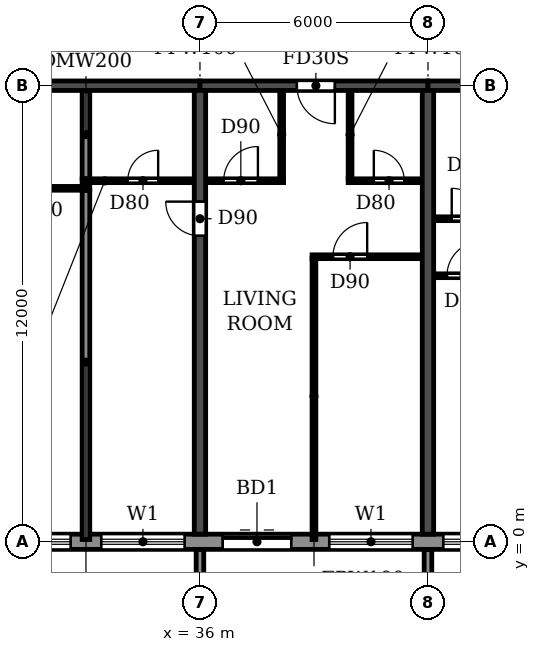
"""IFC4 building model, lengths in metres.
Left out: names, types, materials, properties, quantities, classifications, styles, units other than length and angle.
Written with IfcOpenShell. Run it as: python <this file> out.ifc"""

import sys

from ifc_helpers import new_model, si_unit, direction, frame, frame_2d, origin, place, context, subcontext, project, spatial, polyline, rectangle, outline, extrude, source, transform, mapped, element, fill, save


model = new_model("IFC4")
c1 = context("Model", 3, precision=1e-05, world=origin(), true_north=direction((0.0, 1.0)))
c2 = subcontext(c1, "Body", "Model", "MODEL_VIEW")
j1 = project(units=[si_unit("LENGTHUNIT", "METRE"), si_unit("PLANEANGLEUNIT", "RADIAN")], contexts=[c1])
p1 = place(None, origin())
s1 = spatial("IfcSite", under=j1, at=p1, CompositionType="ELEMENT")
p2 = place(p1, origin())
s2 = spatial("IfcBuilding", under=s1, at=p2, CompositionType="ELEMENT")
p3 = place(p2, frame((0.0, 0.0, 132.3)))
s3 = spatial("IfcBuildingStorey", under=s2, at=p3, CompositionType="ELEMENT", Elevation=132.3)
p4 = place(p3, frame((36.0, 0.2, 0.0), z_axis=(0.0, 0.0, 1.0), x_axis=(0.0, 1.0, 0.0)))
e1 = element("IfcWall", 1, at=p4, inside=s3, PredefinedType="SHEAR", context=c2, shape_type="SweptSolid", body=[
    extrude(rectangle(XDim=11.675, YDim=0.3, at=frame_2d((5.837, 0.0))), origin(), (0.0, 0.0, 1.0), 3.07),
])
p5 = place(p4, frame((7.85, 0.0, 0.0)))
e2 = element("IfcOpeningElement", 2, at=p5, cuts=e1, PredefinedType="OPENING", context=c2, shape_type="SweptSolid", body=[
    extrude(rectangle(XDim=0.9, YDim=2.1, at=frame_2d((0.45, 1.05))), frame((0.0, 0.16, 0.0), z_axis=(0.0, -1.0, 0.0), x_axis=(1.0, 0.0, 0.0)), (0.0, 0.0, 1.0), 0.32),
])
p6 = place(p3, frame((42.0, 0.2, 0.0), z_axis=(0.0, 0.0, 1.0), x_axis=(0.0, 1.0, 0.0)))
e3 = element("IfcWall", 3, at=p6, inside=s3, PredefinedType="SHEAR", context=c2, shape_type="SweptSolid", body=[
    extrude(rectangle(XDim=11.675, YDim=0.3, at=frame_2d((5.837, 0.0))), origin(), (0.0, 0.0, 1.0), 3.07),
])
p7 = place(p3, frame((30.0, 12.0, 0.0), z_axis=(0.0, 0.0, 1.0), x_axis=(1.0, 0.0, 0.0)))
e4 = element("IfcWall", 4, at=p7, inside=s3, PredefinedType="SHEAR", context=c2, shape_type="SweptSolid", body=[
    extrude(rectangle(XDim=6.0, YDim=0.25, at=frame_2d((3.0, 0.0))), origin(), (0.0, 0.0, 1.0), 2.47),
])
p8 = place(p3, frame((36.0, 12.0, 0.0), z_axis=(0.0, 0.0, 1.0), x_axis=(1.0, 0.0, 0.0)))
e5 = element("IfcWall", 5, at=p8, inside=s3, PredefinedType="SHEAR", context=c2, shape_type="SweptSolid", body=[
    extrude(rectangle(XDim=6.0, YDim=0.25, at=frame_2d((3.0, 0.0))), origin(), (0.0, 0.0, 1.0), 2.47),
])
p9 = place(p8, frame((2.55, 0.0, 0.0)))
e6 = element("IfcOpeningElement", 6, at=p9, cuts=e5, PredefinedType="OPENING", context=c2, shape_type="SweptSolid", body=[
    extrude(rectangle(XDim=1.0, YDim=2.1, at=frame_2d((0.5, 1.05))), frame((0.0, 0.135, 0.0), z_axis=(0.0, -1.0, 0.0), x_axis=(1.0, 0.0, 0.0)), (0.0, 0.0, 1.0), 0.27),
])
p10 = place(p3, frame((42.0, 12.0, 0.0), z_axis=(0.0, 0.0, 1.0), x_axis=(1.0, 0.0, 0.0)))
e7 = element("IfcWall", 7, at=p10, inside=s3, PredefinedType="SHEAR", context=c2, shape_type="SweptSolid", body=[
    extrude(rectangle(XDim=6.0, YDim=0.25, at=frame_2d((3.0, 0.0))), origin(), (0.0, 0.0, 1.0), 2.47),
])
p11 = place(p10, frame((2.45, 0.0, 0.0)))
e8 = element("IfcOpeningElement", 8, at=p11, cuts=e7, PredefinedType="OPENING", context=c2, shape_type="SweptSolid", body=[
    extrude(rectangle(XDim=1.0, YDim=2.1, at=frame_2d((0.5, 1.05))), frame((0.0, 0.135, 0.0), z_axis=(0.0, -1.0, 0.0), x_axis=(1.0, 0.0, 0.0)), (0.0, 0.0, 1.0), 0.27),
])
p12 = place(p3, frame((16.683, 0.0, 0.0), z_axis=(0.0, 0.0, 1.0), x_axis=(1.0, 0.0, 0.0)))
e9 = element("IfcWall", 9, at=p12, inside=s3, PredefinedType="STANDARD", context=c2, shape_type="SweptSolid", body=[
    extrude(rectangle(XDim=68.634, YDim=0.4, at=frame_2d((34.317, 0.0))), origin(), (0.0, 0.0, 1.0), 3.07),
])
p13 = place(p12, frame((1.717, 0.0, 0.9)))
e10 = element("IfcOpeningElement", 10, at=p13, cuts=e9, PredefinedType="OPENING", context=c2, shape_type="SweptSolid", body=[
    extrude(rectangle(XDim=2.2, YDim=1.5, at=frame_2d((1.1, 0.75))), frame((0.0, 0.21, 0.0), z_axis=(0.0, -1.0, 0.0), x_axis=(1.0, 0.0, 0.0)), (0.0, 0.0, 1.0), 0.42),
])
p14 = place(p12, frame((4.717, 0.0, 0.9)))
e11 = element("IfcOpeningElement", 11, at=p14, cuts=e9, PredefinedType="OPENING", context=c2, shape_type="SweptSolid", body=[
    extrude(rectangle(XDim=2.2, YDim=1.5, at=frame_2d((1.1, 0.75))), frame((0.0, 0.21, 0.0), z_axis=(0.0, -1.0, 0.0), x_axis=(1.0, 0.0, 0.0)), (0.0, 0.0, 1.0), 0.42),
])
p15 = place(p12, frame((7.717, 0.0, 0.9)))
e12 = element("IfcOpeningElement", 12, at=p15, cuts=e9, PredefinedType="OPENING", context=c2, shape_type="SweptSolid", body=[
    extrude(rectangle(XDim=2.2, YDim=1.5, at=frame_2d((1.1, 0.75))), frame((0.0, 0.21, 0.0), z_axis=(0.0, -1.0, 0.0), x_axis=(1.0, 0.0, 0.0)), (0.0, 0.0, 1.0), 0.42),
])
p16 = place(p12, frame((10.917, 0.0, 0.0)))
e13 = element("IfcOpeningElement", 13, at=p16, cuts=e9, PredefinedType="OPENING", context=c2, shape_type="SweptSolid", body=[
    extrude(rectangle(XDim=1.8, YDim=2.4, at=frame_2d((0.9, 1.2))), frame((0.0, 0.21, 0.0), z_axis=(0.0, -1.0, 0.0), x_axis=(1.0, 0.0, 0.0)), (0.0, 0.0, 1.0), 0.42),
])
p17 = place(p12, frame((13.717, 0.0, 0.9)))
e14 = element("IfcOpeningElement", 14, at=p17, cuts=e9, PredefinedType="OPENING", context=c2, shape_type="SweptSolid", body=[
    extrude(rectangle(XDim=2.2, YDim=1.5, at=frame_2d((1.1, 0.75))), frame((0.0, 0.21, 0.0), z_axis=(0.0, -1.0, 0.0), x_axis=(1.0, 0.0, 0.0)), (0.0, 0.0, 1.0), 0.42),
])
p18 = place(p12, frame((16.717, 0.0, 0.9)))
e15 = element("IfcOpeningElement", 15, at=p18, cuts=e9, PredefinedType="OPENING", context=c2, shape_type="SweptSolid", body=[
    extrude(rectangle(XDim=2.2, YDim=1.5, at=frame_2d((1.1, 0.75))), frame((0.0, 0.21, 0.0), z_axis=(0.0, -1.0, 0.0), x_axis=(1.0, 0.0, 0.0)), (0.0, 0.0, 1.0), 0.42),
])
p19 = place(p12, frame((19.917, 0.0, 0.0)))
e16 = element("IfcOpeningElement", 16, at=p19, cuts=e9, PredefinedType="OPENING", context=c2, shape_type="SweptSolid", body=[
    extrude(rectangle(XDim=1.8, YDim=2.4, at=frame_2d((0.9, 1.2))), frame((0.0, 0.21, 0.0), z_axis=(0.0, -1.0, 0.0), x_axis=(1.0, 0.0, 0.0)), (0.0, 0.0, 1.0), 0.42),
])
p20 = place(p12, frame((22.717, 0.0, 0.9)))
e17 = element("IfcOpeningElement", 17, at=p20, cuts=e9, PredefinedType="OPENING", context=c2, shape_type="SweptSolid", body=[
    extrude(rectangle(XDim=2.2, YDim=1.5, at=frame_2d((1.1, 0.75))), frame((0.0, 0.21, 0.0), z_axis=(0.0, -1.0, 0.0), x_axis=(1.0, 0.0, 0.0)), (0.0, 0.0, 1.0), 0.42),
])
p21 = place(p12, frame((25.717, 0.0, 0.9)))
e18 = element("IfcOpeningElement", 18, at=p21, cuts=e9, PredefinedType="OPENING", context=c2, shape_type="SweptSolid", body=[
    extrude(rectangle(XDim=2.2, YDim=1.5, at=frame_2d((1.1, 0.75))), frame((0.0, 0.21, 0.0), z_axis=(0.0, -1.0, 0.0), x_axis=(1.0, 0.0, 0.0)), (0.0, 0.0, 1.0), 0.42),
])
p22 = place(p12, frame((28.717, 0.0, 0.9)))
e19 = element("IfcOpeningElement", 19, at=p22, cuts=e9, PredefinedType="OPENING", context=c2, shape_type="SweptSolid", body=[
    extrude(rectangle(XDim=2.2, YDim=1.5, at=frame_2d((1.1, 0.75))), frame((0.0, 0.21, 0.0), z_axis=(0.0, -1.0, 0.0), x_axis=(1.0, 0.0, 0.0)), (0.0, 0.0, 1.0), 0.42),
])
p23 = place(p12, frame((31.917, 0.0, 0.0)))
e20 = element("IfcOpeningElement", 20, at=p23, cuts=e9, PredefinedType="OPENING", context=c2, shape_type="SweptSolid", body=[
    extrude(rectangle(XDim=1.8, YDim=2.4, at=frame_2d((0.9, 1.2))), frame((0.0, 0.21, 0.0), z_axis=(0.0, -1.0, 0.0), x_axis=(1.0, 0.0, 0.0)), (0.0, 0.0, 1.0), 0.42),
])
p24 = place(p12, frame((34.717, 0.0, 0.9)))
e21 = element("IfcOpeningElement", 21, at=p24, cuts=e9, PredefinedType="OPENING", context=c2, shape_type="SweptSolid", body=[
    extrude(rectangle(XDim=2.2, YDim=1.5, at=frame_2d((1.1, 0.75))), frame((0.0, 0.21, 0.0), z_axis=(0.0, -1.0, 0.0), x_axis=(1.0, 0.0, 0.0)), (0.0, 0.0, 1.0), 0.42),
])
p25 = place(p12, frame((37.717, 0.0, 0.9)))
e22 = element("IfcOpeningElement", 22, at=p25, cuts=e9, PredefinedType="OPENING", context=c2, shape_type="SweptSolid", body=[
    extrude(rectangle(XDim=2.2, YDim=1.5, at=frame_2d((1.1, 0.75))), frame((0.0, 0.21, 0.0), z_axis=(0.0, -1.0, 0.0), x_axis=(1.0, 0.0, 0.0)), (0.0, 0.0, 1.0), 0.42),
])
p26 = place(p12, frame((40.717, 0.0, 0.9)))
e23 = element("IfcOpeningElement", 23, at=p26, cuts=e9, PredefinedType="OPENING", context=c2, shape_type="SweptSolid", body=[
    extrude(rectangle(XDim=2.2, YDim=1.5, at=frame_2d((1.1, 0.75))), frame((0.0, 0.21, 0.0), z_axis=(0.0, -1.0, 0.0), x_axis=(1.0, 0.0, 0.0)), (0.0, 0.0, 1.0), 0.42),
])
p27 = place(p12, frame((43.717, 0.0, 0.9)))
e24 = element("IfcOpeningElement", 24, at=p27, cuts=e9, PredefinedType="OPENING", context=c2, shape_type="SweptSolid", body=[
    extrude(rectangle(XDim=2.2, YDim=1.5, at=frame_2d((1.1, 0.75))), frame((0.0, 0.21, 0.0), z_axis=(0.0, -1.0, 0.0), x_axis=(1.0, 0.0, 0.0)), (0.0, 0.0, 1.0), 0.42),
])
p28 = place(p12, frame((46.917, 0.0, 0.0)))
e25 = element("IfcOpeningElement", 25, at=p28, cuts=e9, PredefinedType="OPENING", context=c2, shape_type="SweptSolid", body=[
    extrude(rectangle(XDim=1.8, YDim=2.4, at=frame_2d((0.9, 1.2))), frame((0.0, 0.21, 0.0), z_axis=(0.0, -1.0, 0.0), x_axis=(1.0, 0.0, 0.0)), (0.0, 0.0, 1.0), 0.42),
])
p29 = place(p12, frame((49.717, 0.0, 0.9)))
e26 = element("IfcOpeningElement", 26, at=p29, cuts=e9, PredefinedType="OPENING", context=c2, shape_type="SweptSolid", body=[
    extrude(rectangle(XDim=2.2, YDim=1.5, at=frame_2d((1.1, 0.75))), frame((0.0, 0.21, 0.0), z_axis=(0.0, -1.0, 0.0), x_axis=(1.0, 0.0, 0.0)), (0.0, 0.0, 1.0), 0.42),
])
p30 = place(p12, frame((52.717, 0.0, 0.9)))
e27 = element("IfcOpeningElement", 27, at=p30, cuts=e9, PredefinedType="OPENING", context=c2, shape_type="SweptSolid", body=[
    extrude(rectangle(XDim=2.2, YDim=1.5, at=frame_2d((1.1, 0.75))), frame((0.0, 0.21, 0.0), z_axis=(0.0, -1.0, 0.0), x_axis=(1.0, 0.0, 0.0)), (0.0, 0.0, 1.0), 0.42),
])
p31 = place(p12, frame((55.717, 0.0, 0.9)))
e28 = element("IfcOpeningElement", 28, at=p31, cuts=e9, PredefinedType="OPENING", context=c2, shape_type="SweptSolid", body=[
    extrude(rectangle(XDim=2.2, YDim=1.5, at=frame_2d((1.1, 0.75))), frame((0.0, 0.21, 0.0), z_axis=(0.0, -1.0, 0.0), x_axis=(1.0, 0.0, 0.0)), (0.0, 0.0, 1.0), 0.42),
])
p32 = place(p12, frame((58.917, 0.0, 0.0)))
e29 = element("IfcOpeningElement", 29, at=p32, cuts=e9, PredefinedType="OPENING", context=c2, shape_type="SweptSolid", body=[
    extrude(rectangle(XDim=1.8, YDim=2.4, at=frame_2d((0.9, 1.2))), frame((0.0, 0.21, 0.0), z_axis=(0.0, -1.0, 0.0), x_axis=(1.0, 0.0, 0.0)), (0.0, 0.0, 1.0), 0.42),
])
p33 = place(p12, frame((61.717, 0.0, 0.9)))
e30 = element("IfcOpeningElement", 30, at=p33, cuts=e9, PredefinedType="OPENING", context=c2, shape_type="SweptSolid", body=[
    extrude(rectangle(XDim=2.2, YDim=1.5, at=frame_2d((1.1, 0.75))), frame((0.0, 0.21, 0.0), z_axis=(0.0, -1.0, 0.0), x_axis=(1.0, 0.0, 0.0)), (0.0, 0.0, 1.0), 0.42),
])
p34 = place(p12, frame((64.717, 0.0, 0.9)))
e31 = element("IfcOpeningElement", 31, at=p34, cuts=e9, PredefinedType="OPENING", context=c2, shape_type="SweptSolid", body=[
    extrude(rectangle(XDim=2.2, YDim=1.5, at=frame_2d((1.1, 0.75))), frame((0.0, 0.21, 0.0), z_axis=(0.0, -1.0, 0.0), x_axis=(1.0, 0.0, 0.0)), (0.0, 0.0, 1.0), 0.42),
])
m1 = source(origin(), c2, "Body", "SweptSolid", [
    extrude(outline(polyline([(0.0, 0.0), (0.2, 0.0), (0.2, 1.65), (0.0, 1.65), (0.0, 0.0)])), origin(), (0.0, 0.0, 1.0), 3.1),
])
for number, where in (
    (32, (35.9, -1.85, 0.0)),
    (33, (41.9, -1.85, 0.0)),
):
    element("IfcWall", number, at=place(p3, frame(where)), inside=s3, PredefinedType="STANDARD", context=c2, shape_type="MappedRepresentation", body=[
        mapped(m1, transform((0.0, 0.0, 0.0))),
    ])
p35 = place(p3, frame((33.0, 0.06, 0.0), z_axis=(0.0, 0.0, 1.0), x_axis=(0.0, 1.0, 0.0)))
e34 = element("IfcWall", 34, at=p35, inside=s3, PredefinedType="PARTITIONING", context=c2, shape_type="SweptSolid", body=[
    extrude(rectangle(XDim=9.19, YDim=0.2, at=frame_2d((4.595, 0.0))), origin(), (0.0, 0.0, 1.0), 3.07),
])
p36 = place(p3, frame((33.0, 9.55, 0.0), z_axis=(0.0, 0.0, 1.0), x_axis=(0.0, 1.0, 0.0)))
e35 = element("IfcWall", 35, at=p36, inside=s3, PredefinedType="PARTITIONING", context=c2, shape_type="SweptSolid", body=[
    extrude(rectangle(XDim=2.315, YDim=0.2, at=frame_2d((1.157, 0.0))), origin(), (0.0, 0.0, 1.0), 3.07),
])
p37 = place(p3, frame((42.16, 7.0, 0.0), z_axis=(0.0, 0.0, 1.0), x_axis=(1.0, 0.0, 0.0)))
e36 = element("IfcWall", 36, at=p37, inside=s3, PredefinedType="PARTITIONING", context=c2, shape_type="SweptSolid", body=[
    extrude(rectangle(XDim=2.89, YDim=0.1, at=frame_2d((1.445, 0.0))), origin(), (0.0, 0.0, 1.0), 3.07),
])
p38 = place(p37, frame((0.34, 0.0, 0.0)))
e37 = element("IfcOpeningElement", 37, at=p38, cuts=e36, PredefinedType="OPENING", context=c2, shape_type="SweptSolid", body=[
    extrude(rectangle(XDim=0.9, YDim=2.1, at=frame_2d((0.45, 1.05))), frame((0.0, 0.06, 0.0), z_axis=(0.0, -1.0, 0.0), x_axis=(1.0, 0.0, 0.0)), (0.0, 0.0, 1.0), 0.12),
])
p39 = place(p3, frame((38.95, 7.5, 0.0), z_axis=(0.0, 0.0, 1.0), x_axis=(1.0, 0.0, 0.0)))
e38 = element("IfcWall", 38, at=p39, inside=s3, PredefinedType="PARTITIONING", context=c2, shape_type="SweptSolid", body=[
    extrude(rectangle(XDim=2.89, YDim=0.1, at=frame_2d((1.445, 0.0))), origin(), (0.0, 0.0, 1.0), 3.07),
])
p40 = place(p39, frame((0.55, 0.0, 0.0)))
e39 = element("IfcOpeningElement", 39, at=p40, cuts=e38, PredefinedType="OPENING", context=c2, shape_type="SweptSolid", body=[
    extrude(rectangle(XDim=0.9, YDim=2.1, at=frame_2d((0.45, 1.05))), frame((0.0, 0.06, 0.0), z_axis=(0.0, -1.0, 0.0), x_axis=(1.0, 0.0, 0.0)), (0.0, 0.0, 1.0), 0.12),
])
p41 = place(p3, frame((42.16, 8.5, 0.0), z_axis=(0.0, 0.0, 1.0), x_axis=(1.0, 0.0, 0.0)))
e40 = element("IfcWall", 40, at=p41, inside=s3, PredefinedType="PARTITIONING", context=c2, shape_type="SweptSolid", body=[
    extrude(rectangle(XDim=1.94, YDim=0.1, at=frame_2d((0.97, 0.0))), origin(), (0.0, 0.0, 1.0), 3.07),
])
p42 = place(p41, frame((0.465, 0.0, 0.0)))
e41 = element("IfcOpeningElement", 41, at=p42, cuts=e40, PredefinedType="OPENING", context=c2, shape_type="SweptSolid", body=[
    extrude(rectangle(XDim=0.8, YDim=2.1, at=frame_2d((0.4, 1.05))), frame((0.0, 0.06, 0.0), z_axis=(0.0, -1.0, 0.0), x_axis=(1.0, 0.0, 0.0)), (0.0, 0.0, 1.0), 0.12),
])
p43 = place(p3, frame((30.16, 9.3, 0.0), z_axis=(0.0, 0.0, 1.0), x_axis=(1.0, 0.0, 0.0)))
e42 = element("IfcWall", 42, at=p43, inside=s3, PredefinedType="PARTITIONING", context=c2, shape_type="SweptSolid", body=[
    extrude(rectangle(XDim=2.94, YDim=0.1, at=frame_2d((1.47, 0.0))), origin(), (0.0, 0.0, 1.0), 3.07),
])
p44 = place(p43, frame((0.94, 0.0, 0.0)))
e43 = element("IfcOpeningElement", 43, at=p44, cuts=e42, PredefinedType="OPENING", context=c2, shape_type="SweptSolid", body=[
    extrude(rectangle(XDim=0.8, YDim=2.1, at=frame_2d((0.4, 1.05))), frame((0.0, 0.06, 0.0), z_axis=(0.0, -1.0, 0.0), x_axis=(1.0, 0.0, 0.0)), (0.0, 0.0, 1.0), 0.12),
])
p45 = place(p3, frame((32.9, 9.5, 0.0), z_axis=(0.0, 0.0, 1.0), x_axis=(1.0, 0.0, 0.0)))
e44 = element("IfcWall", 44, at=p45, inside=s3, PredefinedType="PARTITIONING", context=c2, shape_type="SweptSolid", body=[
    extrude(rectangle(XDim=2.94, YDim=0.1, at=frame_2d((1.47, 0.0))), origin(), (0.0, 0.0, 1.0), 3.07),
])
p46 = place(p45, frame((1.2, 0.0, 0.0)))
e45 = element("IfcOpeningElement", 45, at=p46, cuts=e44, PredefinedType="OPENING", context=c2, shape_type="SweptSolid", body=[
    extrude(rectangle(XDim=0.8, YDim=2.1, at=frame_2d((0.4, 1.05))), frame((0.0, 0.06, 0.0), z_axis=(0.0, -1.0, 0.0), x_axis=(1.0, 0.0, 0.0)), (0.0, 0.0, 1.0), 0.12),
])
p47 = place(p3, frame((36.16, 9.5, 0.0), z_axis=(0.0, 0.0, 1.0), x_axis=(1.0, 0.0, 0.0)))
e46 = element("IfcWall", 46, at=p47, inside=s3, PredefinedType="PARTITIONING", context=c2, shape_type="SweptSolid", body=[
    extrude(rectangle(XDim=2.04, YDim=0.1, at=frame_2d((1.02, 0.0))), origin(), (0.0, 0.0, 1.0), 3.07),
])
p48 = place(p47, frame((0.465, 0.0, 0.0)))
e47 = element("IfcOpeningElement", 47, at=p48, cuts=e46, PredefinedType="OPENING", context=c2, shape_type="SweptSolid", body=[
    extrude(rectangle(XDim=0.9, YDim=2.1, at=frame_2d((0.45, 1.05))), frame((0.0, 0.06, 0.0), z_axis=(0.0, -1.0, 0.0), x_axis=(1.0, 0.0, 0.0)), (0.0, 0.0, 1.0), 0.12),
])
p49 = place(p3, frame((39.9, 9.5, 0.0), z_axis=(0.0, 0.0, 1.0), x_axis=(1.0, 0.0, 0.0)))
e48 = element("IfcWall", 48, at=p49, inside=s3, PredefinedType="PARTITIONING", context=c2, shape_type="SweptSolid", body=[
    extrude(rectangle(XDim=1.94, YDim=0.1, at=frame_2d((0.97, 0.0))), origin(), (0.0, 0.0, 1.0), 3.07),
])
p50 = place(p49, frame((0.675, 0.0, 0.0)))
e49 = element("IfcOpeningElement", 49, at=p50, cuts=e48, PredefinedType="OPENING", context=c2, shape_type="SweptSolid", body=[
    extrude(rectangle(XDim=0.8, YDim=2.1, at=frame_2d((0.4, 1.05))), frame((0.0, 0.06, 0.0), z_axis=(0.0, -1.0, 0.0), x_axis=(1.0, 0.0, 0.0)), (0.0, 0.0, 1.0), 0.12),
])
p51 = place(p3, frame((38.15, 9.55, 0.0), z_axis=(0.0, 0.0, 1.0), x_axis=(0.0, 1.0, 0.0)))
e50 = element("IfcWall", 50, at=p51, inside=s3, PredefinedType="PARTITIONING", context=c2, shape_type="SweptSolid", body=[
    extrude(rectangle(XDim=2.315, YDim=0.1, at=frame_2d((1.157, 0.0))), origin(), (0.0, 0.0, 1.0), 3.07),
])
p52 = place(p3, frame((39.0, 0.06, 0.0), z_axis=(0.0, 0.0, 1.0), x_axis=(0.0, 1.0, 0.0)))
e51 = element("IfcWall", 51, at=p52, inside=s3, PredefinedType="PARTITIONING", context=c2, shape_type="SweptSolid", body=[
    extrude(rectangle(XDim=7.39, YDim=0.1, at=frame_2d((3.695, 0.0))), origin(), (0.0, 0.0, 1.0), 3.07),
])
p53 = place(p3, frame((39.95, 9.55, 0.0), z_axis=(0.0, 0.0, 1.0), x_axis=(0.0, 1.0, 0.0)))
e52 = element("IfcWall", 52, at=p53, inside=s3, PredefinedType="PARTITIONING", context=c2, shape_type="SweptSolid", body=[
    extrude(rectangle(XDim=2.315, YDim=0.1, at=frame_2d((1.157, 0.0))), origin(), (0.0, 0.0, 1.0), 3.07),
])
p54 = place(p17, origin())
e53 = element("IfcWindow", 53, at=p54, inside=s3, PartitioningType="DOUBLE_PANEL_HORIZONTAL", PredefinedType="WINDOW", context=c2, shape_type="SweptSolid", body=[
    extrude(rectangle(XDim=2.2, YDim=1.5, at=frame_2d((1.1, 0.75))), frame((0.0, 0.03, 0.0), z_axis=(0.0, -1.0, 0.0), x_axis=(1.0, 0.0, 0.0)), (0.0, 0.0, 1.0), 0.06),
])
fill(e14, e53)
p55 = place(p18, origin())
e54 = element("IfcWindow", 54, at=p55, inside=s3, PartitioningType="DOUBLE_PANEL_HORIZONTAL", PredefinedType="WINDOW", context=c2, shape_type="SweptSolid", body=[
    extrude(rectangle(XDim=2.2, YDim=1.5, at=frame_2d((1.1, 0.75))), frame((0.0, 0.03, 0.0), z_axis=(0.0, -1.0, 0.0), x_axis=(1.0, 0.0, 0.0)), (0.0, 0.0, 1.0), 0.06),
])
fill(e15, e54)
p56 = place(p19, origin())
e55 = element("IfcDoor", 55, at=p56, inside=s3, OperationType="DOUBLE_DOOR_SLIDING", PredefinedType="DOOR", context=c2, shape_type="SweptSolid", body=[
    extrude(rectangle(XDim=1.8, YDim=2.4, at=frame_2d((0.9, 1.2))), frame((0.0, 0.025, 0.0), z_axis=(0.0, -1.0, 0.0), x_axis=(1.0, 0.0, 0.0)), (0.0, 0.0, 1.0), 0.05),
])
fill(e16, e55)
p57 = place(p20, origin())
e56 = element("IfcWindow", 56, at=p57, inside=s3, PartitioningType="DOUBLE_PANEL_HORIZONTAL", PredefinedType="WINDOW", context=c2, shape_type="SweptSolid", body=[
    extrude(rectangle(XDim=2.2, YDim=1.5, at=frame_2d((1.1, 0.75))), frame((0.0, 0.03, 0.0), z_axis=(0.0, -1.0, 0.0), x_axis=(1.0, 0.0, 0.0)), (0.0, 0.0, 1.0), 0.06),
])
fill(e17, e56)
p58 = place(p21, origin())
e57 = element("IfcWindow", 57, at=p58, inside=s3, PartitioningType="DOUBLE_PANEL_HORIZONTAL", PredefinedType="WINDOW", context=c2, shape_type="SweptSolid", body=[
    extrude(rectangle(XDim=2.2, YDim=1.5, at=frame_2d((1.1, 0.75))), frame((0.0, 0.03, 0.0), z_axis=(0.0, -1.0, 0.0), x_axis=(1.0, 0.0, 0.0)), (0.0, 0.0, 1.0), 0.06),
])
fill(e18, e57)
p59 = place(p46, origin())
e58 = element("IfcDoor", 58, at=p59, inside=s3, OperationType="SINGLE_SWING_RIGHT", PredefinedType="DOOR", context=c2, shape_type="SweptSolid", body=[
    extrude(rectangle(XDim=0.8, YDim=2.1, at=frame_2d((0.4, 1.05))), frame((0.0, 0.025, 0.0), z_axis=(0.0, -1.0, 0.0), x_axis=(1.0, 0.0, 0.0)), (0.0, 0.0, 1.0), 0.05),
])
fill(e45, e58)
p60 = place(p5, origin())
e59 = element("IfcDoor", 59, at=p60, inside=s3, OperationType="SINGLE_SWING_RIGHT", PredefinedType="DOOR", context=c2, shape_type="SweptSolid", body=[
    extrude(rectangle(XDim=0.9, YDim=2.1, at=frame_2d((0.45, 1.05))), frame((0.0, 0.025, 0.0), z_axis=(0.0, -1.0, 0.0), x_axis=(1.0, 0.0, 0.0)), (0.0, 0.0, 1.0), 0.05),
])
fill(e2, e59)
p61 = place(p48, origin())
e60 = element("IfcDoor", 60, at=p61, inside=s3, OperationType="SINGLE_SWING_RIGHT", PredefinedType="DOOR", context=c2, shape_type="SweptSolid", body=[
    extrude(rectangle(XDim=0.9, YDim=2.1, at=frame_2d((0.45, 1.05))), frame((0.0, 0.025, 0.0), z_axis=(0.0, -1.0, 0.0), x_axis=(1.0, 0.0, 0.0)), (0.0, 0.0, 1.0), 0.05),
])
fill(e47, e60)
p62 = place(p9, frame((1.0, 0.0, 0.0), z_axis=(0.0, 0.0, 1.0), x_axis=(-1.0, 0.0, 0.0)))
e61 = element("IfcDoor", 61, at=p62, inside=s3, OperationType="SINGLE_SWING_LEFT", PredefinedType="DOOR", context=c2, shape_type="SweptSolid", body=[
    extrude(rectangle(XDim=1.0, YDim=2.1, at=frame_2d((0.5, 1.05))), frame((0.0, 0.025, 0.0), z_axis=(0.0, -1.0, 0.0), x_axis=(1.0, 0.0, 0.0)), (0.0, 0.0, 1.0), 0.05),
])
fill(e6, e61)
p63 = place(p40, origin())
e62 = element("IfcDoor", 62, at=p63, inside=s3, OperationType="SINGLE_SWING_RIGHT", PredefinedType="DOOR", context=c2, shape_type="SweptSolid", body=[
    extrude(rectangle(XDim=0.9, YDim=2.1, at=frame_2d((0.45, 1.05))), frame((0.0, 0.025, 0.0), z_axis=(0.0, -1.0, 0.0), x_axis=(1.0, 0.0, 0.0)), (0.0, 0.0, 1.0), 0.05),
])
fill(e39, e62)
p64 = place(p50, origin())
e63 = element("IfcDoor", 63, at=p64, inside=s3, OperationType="SINGLE_SWING_LEFT", PredefinedType="DOOR", context=c2, shape_type="SweptSolid", body=[
    extrude(rectangle(XDim=0.8, YDim=2.1, at=frame_2d((0.4, 1.05))), frame((0.0, 0.025, 0.0), z_axis=(0.0, -1.0, 0.0), x_axis=(1.0, 0.0, 0.0)), (0.0, 0.0, 1.0), 0.05),
])
fill(e49, e63)
p65 = place(p38, origin())
e64 = element("IfcDoor", 64, at=p65, inside=s3, OperationType="SINGLE_SWING_RIGHT", PredefinedType="DOOR", context=c2, shape_type="SweptSolid", body=[
    extrude(rectangle(XDim=0.9, YDim=2.1, at=frame_2d((0.45, 1.05))), frame((0.0, 0.025, 0.0), z_axis=(0.0, -1.0, 0.0), x_axis=(1.0, 0.0, 0.0)), (0.0, 0.0, 1.0), 0.05),
])
fill(e37, e64)
p66 = place(p42, origin())
e65 = element("IfcDoor", 65, at=p66, inside=s3, OperationType="SINGLE_SWING_LEFT", PredefinedType="DOOR", context=c2, shape_type="SweptSolid", body=[
    extrude(rectangle(XDim=0.8, YDim=2.1, at=frame_2d((0.4, 1.05))), frame((0.0, 0.025, 0.0), z_axis=(0.0, -1.0, 0.0), x_axis=(1.0, 0.0, 0.0)), (0.0, 0.0, 1.0), 0.05),
])
fill(e41, e65)
save(model, sys.argv[1])
